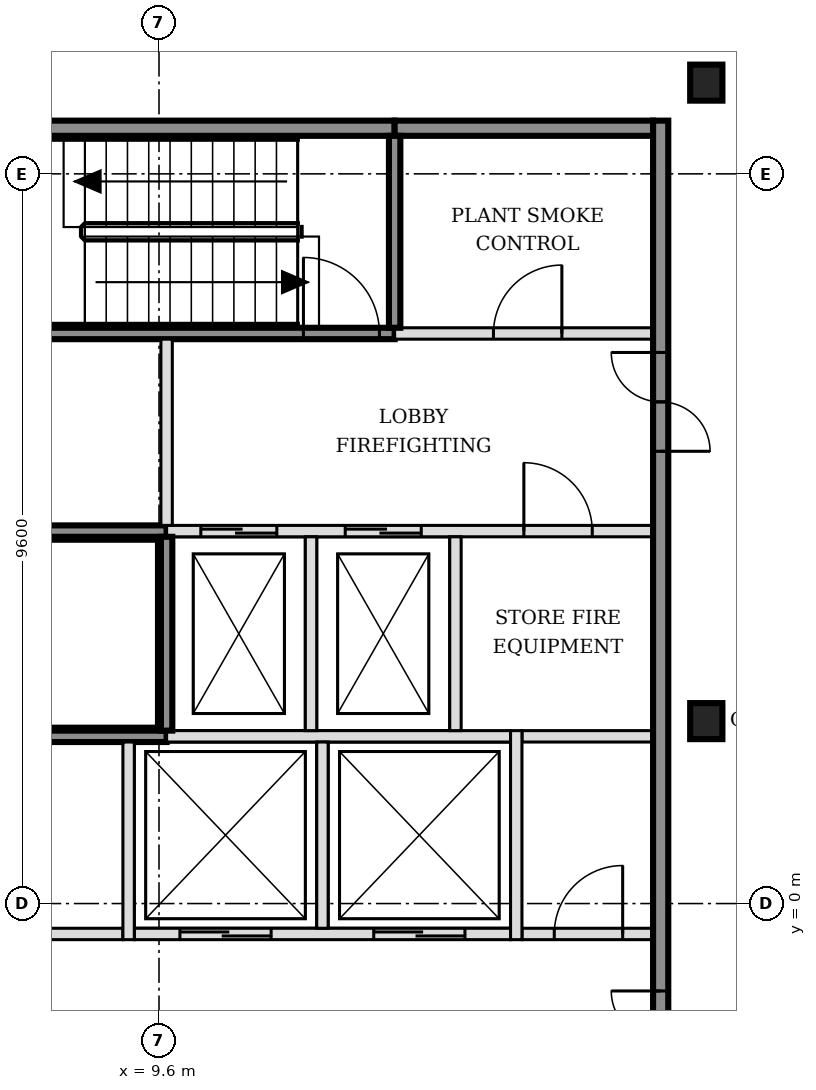
"""IFC4 building model, lengths in metres.
Left out: names, types, materials, properties, quantities, classifications, styles, units other than length and angle.
Written with IfcOpenShell. Run it as: python <this file> out.ifc"""

import sys

from ifc_helpers import new_model, si_unit, direction, frame, frame_2d, origin, origin_2d, place, context, subcontext, project, spatial, rectangle, i_section, extrude, element, fill, save


model = new_model("IFC4")
c1 = context("Model", 3, precision=1e-05, world=origin(), true_north=direction((0.0, 1.0)))
c2 = subcontext(c1, "Body", "Model", "MODEL_VIEW")
j1 = project(units=[si_unit("LENGTHUNIT", "METRE"), si_unit("PLANEANGLEUNIT", "RADIAN")], contexts=[c1])
p1 = place(None, origin())
s1 = spatial("IfcSite", under=j1, at=p1, CompositionType="ELEMENT")
p2 = place(p1, origin())
s2 = spatial("IfcBuilding", under=s1, at=p2, CompositionType="ELEMENT")
p3 = place(p2, frame((0.0, 0.0, 132.6)))
s3 = spatial("IfcBuildingStorey", under=s2, at=p3, CompositionType="ELEMENT", Elevation=132.6)
for number, where, z_axis, x_axis in (
    (1, (16.8, 2.4, -0.15), (0.0, 0.0, 1.0), (1.0, 0.0, 0.0)),
    (2, (16.8, 10.8, -0.15), (0.0, 0.0, 1.0), (1.0, 0.0, 0.0)),
):
    element("IfcColumn", number, at=place(p3, frame(where, z_axis=z_axis, x_axis=x_axis)), inside=s3, PredefinedType="COLUMN", context=c2, shape_type="SweptSolid", body=[
        extrude(i_section(OverallWidth=0.424, OverallDepth=0.474, WebThickness=0.048, FlangeThickness=0.077, FilletRadius=0.015, at=origin_2d()), origin(), (0.0, 0.0, 1.0), 3.6),
    ])
p4 = place(p3, frame((-1.7, -0.4, 0.0), z_axis=(0.0, 0.0, 1.0), x_axis=(1.0, 0.0, 0.0)))
e3 = element("IfcWall", 3, at=p4, inside=s3, PredefinedType="PARTITIONING", context=c2, shape_type="SweptSolid", body=[
    extrude(rectangle(XDim=10.825, YDim=0.15, at=frame_2d((5.413, 0.0))), origin(), (0.0, 0.0, 1.0), 3.45),
])
p5 = place(p4, frame((4.95, 0.0, 0.0)))
e4 = element("IfcOpeningElement", 4, at=p5, cuts=e3, PredefinedType="OPENING", context=c2, shape_type="SweptSolid", body=[
    extrude(rectangle(XDim=0.9, YDim=2.1, at=frame_2d((0.45, 1.05))), frame((0.0, 0.085, 0.0), z_axis=(0.0, -1.0, 0.0), x_axis=(1.0, 0.0, 0.0)), (0.0, 0.0, 1.0), 0.17),
])
p6 = place(p3, frame((9.275, -0.4, 0.0), z_axis=(0.0, 0.0, 1.0), x_axis=(1.0, 0.0, 0.0)))
e5 = element("IfcWall", 5, at=p6, inside=s3, PredefinedType="SOLIDWALL", context=c2, shape_type="SweptSolid", body=[
    extrude(rectangle(XDim=4.95, YDim=0.15, at=frame_2d((2.475, 0.0))), origin(), (0.0, 0.0, 1.0), 3.45),
])
p7 = place(p6, frame((0.6, 0.0, 0.0)))
e6 = element("IfcOpeningElement", 6, at=p7, cuts=e5, PredefinedType="OPENING", context=c2, shape_type="SweptSolid", body=[
    extrude(rectangle(XDim=1.2, YDim=2.1, at=frame_2d((0.6, 1.05))), frame((0.0, 0.085, 0.0), z_axis=(0.0, -1.0, 0.0), x_axis=(1.0, 0.0, 0.0)), (0.0, 0.0, 1.0), 0.17),
])
p8 = place(p6, frame((3.15, 0.0, 0.0)))
e7 = element("IfcOpeningElement", 7, at=p8, cuts=e5, PredefinedType="OPENING", context=c2, shape_type="SweptSolid", body=[
    extrude(rectangle(XDim=1.2, YDim=2.1, at=frame_2d((0.6, 1.05))), frame((0.0, 0.085, 0.0), z_axis=(0.0, -1.0, 0.0), x_axis=(1.0, 0.0, 0.0)), (0.0, 0.0, 1.0), 0.17),
])
p9 = place(p3, frame((14.375, -0.4, 0.0), z_axis=(0.0, 0.0, 1.0), x_axis=(1.0, 0.0, 0.0)))
e8 = element("IfcWall", 8, at=p9, inside=s3, PredefinedType="PARTITIONING", context=c2, shape_type="SweptSolid", body=[
    extrude(rectangle(XDim=1.725, YDim=0.15, at=frame_2d((0.863, 0.0))), origin(), (0.0, 0.0, 1.0), 3.45),
])
p10 = place(p9, frame((0.425, 0.0, 0.0)))
e9 = element("IfcOpeningElement", 9, at=p10, cuts=e8, PredefinedType="OPENING", context=c2, shape_type="SweptSolid", body=[
    extrude(rectangle(XDim=0.9, YDim=2.1, at=frame_2d((0.45, 1.05))), frame((0.0, 0.085, 0.0), z_axis=(0.0, -1.0, 0.0), x_axis=(1.0, 0.0, 0.0)), (0.0, 0.0, 1.0), 0.17),
])
p11 = place(p3, frame((3.2, 2.2, 0.0), z_axis=(0.0, 0.0, 1.0), x_axis=(1.0, 0.0, 0.0)))
e10 = element("IfcWall", 10, at=p11, inside=s3, PredefinedType="SOLIDWALL", context=c2, shape_type="SweptSolid", body=[
    extrude(rectangle(XDim=6.5, YDim=0.15, at=frame_2d((3.25, 0.0))), origin(), (0.0, 0.0, 1.0), 3.45),
])
p12 = place(p3, frame((9.7, 2.2, 0.0), z_axis=(0.0, 0.0, 1.0), x_axis=(1.0, 0.0, 0.0)))
e11 = element("IfcWall", 11, at=p12, inside=s3, PredefinedType="SOLIDWALL", context=c2, shape_type="SweptSolid", body=[
    extrude(rectangle(XDim=4.525, YDim=0.15, at=frame_2d((2.263, 0.0))), origin(), (0.0, 0.0, 1.0), 3.45),
])
p13 = place(p3, frame((14.375, 2.2, 0.0), z_axis=(0.0, 0.0, 1.0), x_axis=(1.0, 0.0, 0.0)))
e12 = element("IfcWall", 12, at=p13, inside=s3, PredefinedType="PARTITIONING", context=c2, shape_type="SweptSolid", body=[
    extrude(rectangle(XDim=1.725, YDim=0.15, at=frame_2d((0.863, 0.0))), origin(), (0.0, 0.0, 1.0), 3.45),
])
p14 = place(p3, frame((3.2, 4.9, 0.0), z_axis=(0.0, 0.0, 1.0), x_axis=(1.0, 0.0, 0.0)))
e13 = element("IfcWall", 13, at=p14, inside=s3, PredefinedType="SOLIDWALL", context=c2, shape_type="SweptSolid", body=[
    extrude(rectangle(XDim=6.5, YDim=0.15, at=frame_2d((3.25, 0.0))), origin(), (0.0, 0.0, 1.0), 3.45),
])
p15 = place(p14, frame((0.175, 0.0, 0.0)))
e14 = element("IfcOpeningElement", 14, at=p15, cuts=e13, PredefinedType="OPENING", context=c2, shape_type="SweptSolid", body=[
    extrude(rectangle(XDim=1.0, YDim=2.1, at=frame_2d((0.5, 1.05))), frame((0.0, 0.085, 0.0), z_axis=(0.0, -1.0, 0.0), x_axis=(1.0, 0.0, 0.0)), (0.0, 0.0, 1.0), 0.17),
])
p16 = place(p3, frame((9.7, 4.9, 0.0), z_axis=(0.0, 0.0, 1.0), x_axis=(1.0, 0.0, 0.0)))
e15 = element("IfcWall", 15, at=p16, inside=s3, PredefinedType="SOLIDWALL", context=c2, shape_type="SweptSolid", body=[
    extrude(rectangle(XDim=6.4, YDim=0.15, at=frame_2d((3.2, 0.0))), origin(), (0.0, 0.0, 1.0), 3.45),
])
p17 = place(p16, frame((0.45, 0.0, 0.0)))
e16 = element("IfcOpeningElement", 16, at=p17, cuts=e15, PredefinedType="OPENING", context=c2, shape_type="SweptSolid", body=[
    extrude(rectangle(XDim=1.0, YDim=2.1, at=frame_2d((0.5, 1.05))), frame((0.0, 0.085, 0.0), z_axis=(0.0, -1.0, 0.0), x_axis=(1.0, 0.0, 0.0)), (0.0, 0.0, 1.0), 0.17),
])
p18 = place(p16, frame((2.35, 0.0, 0.0)))
e17 = element("IfcOpeningElement", 17, at=p18, cuts=e15, PredefinedType="OPENING", context=c2, shape_type="SweptSolid", body=[
    extrude(rectangle(XDim=1.0, YDim=2.1, at=frame_2d((0.5, 1.05))), frame((0.0, 0.085, 0.0), z_axis=(0.0, -1.0, 0.0), x_axis=(1.0, 0.0, 0.0)), (0.0, 0.0, 1.0), 0.17),
])
p19 = place(p16, frame((4.7, 0.0, 0.0)))
e18 = element("IfcOpeningElement", 18, at=p19, cuts=e15, PredefinedType="OPENING", context=c2, shape_type="SweptSolid", body=[
    extrude(rectangle(XDim=0.9, YDim=2.1, at=frame_2d((0.45, 1.05))), frame((0.0, 0.085, 0.0), z_axis=(0.0, -1.0, 0.0), x_axis=(1.0, 0.0, 0.0)), (0.0, 0.0, 1.0), 0.17),
])
p20 = place(p3, frame((6.275, 7.5, 0.0), z_axis=(0.0, 0.0, 1.0), x_axis=(1.0, 0.0, 0.0)))
e19 = element("IfcWall", 19, at=p20, inside=s3, PredefinedType="SOLIDWALL", context=c2, shape_type="SweptSolid", body=[
    extrude(rectangle(XDim=6.425, YDim=0.15, at=frame_2d((3.212, 0.0))), origin(), (0.0, 0.0, 1.0), 3.45),
])
p21 = place(p20, frame((5.225, 0.0, 0.0)))
e20 = element("IfcOpeningElement", 20, at=p21, cuts=e19, PredefinedType="OPENING", context=c2, shape_type="SweptSolid", body=[
    extrude(rectangle(XDim=1.0, YDim=2.1, at=frame_2d((0.5, 1.05))), frame((0.0, 0.085, 0.0), z_axis=(0.0, -1.0, 0.0), x_axis=(1.0, 0.0, 0.0)), (0.0, 0.0, 1.0), 0.17),
])
p22 = place(p3, frame((12.7, 7.5, 0.0), z_axis=(0.0, 0.0, 1.0), x_axis=(1.0, 0.0, 0.0)))
e21 = element("IfcWall", 21, at=p22, inside=s3, PredefinedType="SOLIDWALL", context=c2, shape_type="SweptSolid", body=[
    extrude(rectangle(XDim=3.4, YDim=0.15, at=frame_2d((1.7, 0.0))), origin(), (0.0, 0.0, 1.0), 3.45),
])
p23 = place(p22, frame((1.3, 0.0, 0.0)))
e22 = element("IfcOpeningElement", 22, at=p23, cuts=e21, PredefinedType="OPENING", context=c2, shape_type="SweptSolid", body=[
    extrude(rectangle(XDim=0.9, YDim=2.1, at=frame_2d((0.45, 1.05))), frame((0.0, 0.085, 0.0), z_axis=(0.0, -1.0, 0.0), x_axis=(1.0, 0.0, 0.0)), (0.0, 0.0, 1.0), 0.17),
])
p24 = place(p3, frame((6.2, 10.2, 0.0), z_axis=(0.0, 0.0, 1.0), x_axis=(1.0, 0.0, 0.0)))
e23 = element("IfcWall", 23, at=p24, inside=s3, PredefinedType="SOLIDWALL", context=c2, shape_type="SweptSolid", body=[
    extrude(rectangle(XDim=6.5, YDim=0.2, at=frame_2d((3.25, 0.0))), origin(), (0.0, 0.0, 1.0), 3.45),
])
p25 = place(p3, frame((12.7, 10.2, 0.0), z_axis=(0.0, 0.0, 1.0), x_axis=(1.0, 0.0, 0.0)))
e24 = element("IfcWall", 24, at=p25, inside=s3, PredefinedType="SOLIDWALL", context=c2, shape_type="SweptSolid", body=[
    extrude(rectangle(XDim=3.4, YDim=0.2, at=frame_2d((1.7, 0.0))), origin(), (0.0, 0.0, 1.0), 3.45),
])
p26 = place(p3, frame((9.2, -0.475, 0.0), z_axis=(0.0, 0.0, 1.0), x_axis=(0.0, 1.0, 0.0)))
e25 = element("IfcWall", 25, at=p26, inside=s3, PredefinedType="SOLIDWALL", context=c2, shape_type="SweptSolid", body=[
    extrude(rectangle(XDim=2.6, YDim=0.15, at=frame_2d((1.3, 0.0))), origin(), (0.0, 0.0, 1.0), 3.45),
])
p27 = place(p3, frame((9.7, 2.275, 0.0), z_axis=(0.0, 0.0, 1.0), x_axis=(0.0, 1.0, 0.0)))
e26 = element("IfcWall", 26, at=p27, inside=s3, PredefinedType="SOLIDWALL", context=c2, shape_type="SweptSolid", body=[
    extrude(rectangle(XDim=2.55, YDim=0.15, at=frame_2d((1.275, 0.0))), origin(), (0.0, 0.0, 1.0), 3.45),
])
p28 = place(p3, frame((9.7, 4.975, 0.0), z_axis=(0.0, 0.0, 1.0), x_axis=(0.0, 1.0, 0.0)))
e27 = element("IfcWall", 27, at=p28, inside=s3, PredefinedType="SOLIDWALL", context=c2, shape_type="SweptSolid", body=[
    extrude(rectangle(XDim=2.45, YDim=0.15, at=frame_2d((1.225, 0.0))), origin(), (0.0, 0.0, 1.0), 3.45),
])
p29 = place(p3, frame((11.6, 2.275, 0.0), z_axis=(0.0, 0.0, 1.0), x_axis=(0.0, 1.0, 0.0)))
e28 = element("IfcWall", 28, at=p29, inside=s3, PredefinedType="SOLIDWALL", context=c2, shape_type="SweptSolid", body=[
    extrude(rectangle(XDim=2.55, YDim=0.15, at=frame_2d((1.275, 0.0))), origin(), (0.0, 0.0, 1.0), 3.45),
])
p30 = place(p3, frame((11.75, -0.325, 0.0), z_axis=(0.0, 0.0, 1.0), x_axis=(0.0, 1.0, 0.0)))
e29 = element("IfcWall", 29, at=p30, inside=s3, PredefinedType="SOLIDWALL", context=c2, shape_type="SweptSolid", body=[
    extrude(rectangle(XDim=2.45, YDim=0.15, at=frame_2d((1.225, 0.0))), origin(), (0.0, 0.0, 1.0), 3.45),
])
p31 = place(p3, frame((12.7, 7.575, 0.0), z_axis=(0.0, 0.0, 1.0), x_axis=(0.0, 1.0, 0.0)))
e30 = element("IfcWall", 30, at=p31, inside=s3, PredefinedType="SOLIDWALL", context=c2, shape_type="SweptSolid", body=[
    extrude(rectangle(XDim=2.525, YDim=0.15, at=frame_2d((1.263, 0.0))), origin(), (0.0, 0.0, 1.0), 3.45),
])
p32 = place(p3, frame((13.5, 2.275, 0.0), z_axis=(0.0, 0.0, 1.0), x_axis=(0.0, 1.0, 0.0)))
e31 = element("IfcWall", 31, at=p32, inside=s3, PredefinedType="SOLIDWALL", context=c2, shape_type="SweptSolid", body=[
    extrude(rectangle(XDim=2.55, YDim=0.15, at=frame_2d((1.275, 0.0))), origin(), (0.0, 0.0, 1.0), 3.45),
])
p33 = place(p3, frame((14.3, -0.475, 0.0), z_axis=(0.0, 0.0, 1.0), x_axis=(0.0, 1.0, 0.0)))
e32 = element("IfcWall", 32, at=p33, inside=s3, PredefinedType="SOLIDWALL", context=c2, shape_type="SweptSolid", body=[
    extrude(rectangle(XDim=2.75, YDim=0.15, at=frame_2d((1.375, 0.0))), origin(), (0.0, 0.0, 1.0), 3.45),
])
p34 = place(p3, frame((16.2, -5.5, 0.0), z_axis=(0.0, 0.0, 1.0), x_axis=(0.0, 1.0, 0.0)))
e33 = element("IfcWall", 33, at=p34, inside=s3, PredefinedType="SOLIDWALL", context=c2, shape_type="SweptSolid", body=[
    extrude(rectangle(XDim=15.8, YDim=0.2, at=frame_2d((7.9, 0.0))), origin(), (0.0, 0.0, 1.0), 3.45),
])
p35 = place(p34, frame((3.05, 0.0, 0.0)))
e34 = element("IfcOpeningElement", 34, at=p35, cuts=e33, PredefinedType="OPENING", context=c2, shape_type="SweptSolid", body=[
    extrude(rectangle(XDim=1.3, YDim=2.1, at=frame_2d((0.65, 1.05))), frame((0.0, 0.11, 0.0), z_axis=(0.0, -1.0, 0.0), x_axis=(1.0, 0.0, 0.0)), (0.0, 0.0, 1.0), 0.22),
])
p36 = place(p34, frame((11.45, 0.0, 0.0)))
e35 = element("IfcOpeningElement", 35, at=p36, cuts=e33, PredefinedType="OPENING", context=c2, shape_type="SweptSolid", body=[
    extrude(rectangle(XDim=1.3, YDim=2.1, at=frame_2d((0.65, 1.05))), frame((0.0, 0.11, 0.0), z_axis=(0.0, -1.0, 0.0), x_axis=(1.0, 0.0, 0.0)), (0.0, 0.0, 1.0), 0.22),
])
p37 = place(p3, frame((31.072, 4.722, 0.0), z_axis=(0.0, 0.0, 1.0), x_axis=(-0.707106781187, 0.707106781187, 0.0)))
e36 = element("IfcWall", 36, at=p37, inside=s3, PredefinedType="PARTITIONING", context=c2, shape_type="SweptSolid", body=[
    extrude(rectangle(XDim=23.688, YDim=0.15, at=frame_2d((11.844, 0.0))), origin(), (0.0, 0.0, 1.0), 2.73),
])
p38 = place(p37, frame((8.135, 0.0, 0.0)))
e37 = element("IfcOpeningElement", 37, at=p38, cuts=e36, PredefinedType="OPENING", context=c2, shape_type="SweptSolid", body=[
    extrude(rectangle(XDim=0.9, YDim=2.1, at=frame_2d((0.45, 1.05))), frame((0.0, 0.085, 0.0), z_axis=(0.0, -1.0, 0.0), x_axis=(1.0, 0.0, 0.0)), (0.0, 0.0, 1.0), 0.17),
])
p39 = place(p37, frame((13.091, 0.0, 0.0)))
e38 = element("IfcOpeningElement", 38, at=p39, cuts=e36, PredefinedType="OPENING", context=c2, shape_type="SweptSolid", body=[
    extrude(rectangle(XDim=0.9, YDim=2.1, at=frame_2d((0.45, 1.05))), frame((0.0, 0.085, 0.0), z_axis=(0.0, -1.0, 0.0), x_axis=(1.0, 0.0, 0.0)), (0.0, 0.0, 1.0), 0.17),
])
p40 = place(p37, frame((18.69, 0.0, 0.0)))
e39 = element("IfcOpeningElement", 39, at=p40, cuts=e36, PredefinedType="OPENING", context=c2, shape_type="SweptSolid", body=[
    extrude(rectangle(XDim=0.9, YDim=2.1, at=frame_2d((0.45, 1.05))), frame((0.0, 0.085, 0.0), z_axis=(0.0, -1.0, 0.0), x_axis=(1.0, 0.0, 0.0)), (0.0, 0.0, 1.0), 0.17),
])
p41 = place(p7, origin())
e40 = element("IfcDoor", 40, at=p41, inside=s3, OperationType="DOUBLE_DOOR_SLIDING", PredefinedType="DOOR", context=c2, shape_type="SweptSolid", body=[
    extrude(rectangle(XDim=1.2, YDim=2.1, at=frame_2d((0.6, 1.05))), frame((0.0, 0.025, 0.0), z_axis=(0.0, -1.0, 0.0), x_axis=(1.0, 0.0, 0.0)), (0.0, 0.0, 1.0), 0.05),
])
fill(e6, e40)
p42 = place(p8, origin())
e41 = element("IfcDoor", 41, at=p42, inside=s3, OperationType="DOUBLE_DOOR_SLIDING", PredefinedType="DOOR", context=c2, shape_type="SweptSolid", body=[
    extrude(rectangle(XDim=1.2, YDim=2.1, at=frame_2d((0.6, 1.05))), frame((0.0, 0.025, 0.0), z_axis=(0.0, -1.0, 0.0), x_axis=(1.0, 0.0, 0.0)), (0.0, 0.0, 1.0), 0.05),
])
fill(e7, e41)
p43 = place(p17, origin())
e42 = element("IfcDoor", 42, at=p43, inside=s3, OperationType="DOUBLE_DOOR_SLIDING", PredefinedType="DOOR", context=c2, shape_type="SweptSolid", body=[
    extrude(rectangle(XDim=1.0, YDim=2.1, at=frame_2d((0.5, 1.05))), frame((0.0, 0.025, 0.0), z_axis=(0.0, -1.0, 0.0), x_axis=(1.0, 0.0, 0.0)), (0.0, 0.0, 1.0), 0.05),
])
fill(e16, e42)
p44 = place(p18, origin())
e43 = element("IfcDoor", 43, at=p44, inside=s3, OperationType="DOUBLE_DOOR_SLIDING", PredefinedType="DOOR", context=c2, shape_type="SweptSolid", body=[
    extrude(rectangle(XDim=1.0, YDim=2.1, at=frame_2d((0.5, 1.05))), frame((0.0, 0.025, 0.0), z_axis=(0.0, -1.0, 0.0), x_axis=(1.0, 0.0, 0.0)), (0.0, 0.0, 1.0), 0.05),
])
fill(e17, e43)
p45 = place(p21, origin())
e44 = element("IfcDoor", 44, at=p45, inside=s3, OperationType="SINGLE_SWING_LEFT", PredefinedType="DOOR", context=c2, shape_type="SweptSolid", body=[
    extrude(rectangle(XDim=1.0, YDim=2.1, at=frame_2d((0.5, 1.05))), frame((0.0, 0.025, 0.0), z_axis=(0.0, -1.0, 0.0), x_axis=(1.0, 0.0, 0.0)), (0.0, 0.0, 1.0), 0.05),
])
fill(e20, e44)
p46 = place(p35, origin())
e45 = element("IfcDoor", 45, at=p46, inside=s3, OperationType="DOUBLE_DOOR_SINGLE_SWING", PredefinedType="DOOR", context=c2, shape_type="SweptSolid", body=[
    extrude(rectangle(XDim=1.3, YDim=2.1, at=frame_2d((0.65, 1.05))), frame((0.0, 0.025, 0.0), z_axis=(0.0, -1.0, 0.0), x_axis=(1.0, 0.0, 0.0)), (0.0, 0.0, 1.0), 0.05),
])
fill(e34, e45)
p47 = place(p36, origin())
e46 = element("IfcDoor", 46, at=p47, inside=s3, OperationType="DOUBLE_DOOR_SINGLE_SWING", PredefinedType="DOOR", context=c2, shape_type="SweptSolid", body=[
    extrude(rectangle(XDim=1.3, YDim=2.1, at=frame_2d((0.65, 1.05))), frame((0.0, 0.025, 0.0), z_axis=(0.0, -1.0, 0.0), x_axis=(1.0, 0.0, 0.0)), (0.0, 0.0, 1.0), 0.05),
])
fill(e35, e46)
p48 = place(p10, origin())
e47 = element("IfcDoor", 47, at=p48, inside=s3, OperationType="SINGLE_SWING_RIGHT", PredefinedType="DOOR", context=c2, shape_type="SweptSolid", body=[
    extrude(rectangle(XDim=0.9, YDim=2.1, at=frame_2d((0.45, 1.05))), frame((0.0, 0.025, 0.0), z_axis=(0.0, -1.0, 0.0), x_axis=(1.0, 0.0, 0.0)), (0.0, 0.0, 1.0), 0.05),
])
fill(e9, e47)
p49 = place(p19, origin())
e48 = element("IfcDoor", 48, at=p49, inside=s3, OperationType="SINGLE_SWING_LEFT", PredefinedType="DOOR", context=c2, shape_type="SweptSolid", body=[
    extrude(rectangle(XDim=0.9, YDim=2.1, at=frame_2d((0.45, 1.05))), frame((0.0, 0.025, 0.0), z_axis=(0.0, -1.0, 0.0), x_axis=(1.0, 0.0, 0.0)), (0.0, 0.0, 1.0), 0.05),
])
fill(e18, e48)
p50 = place(p23, origin())
e49 = element("IfcDoor", 49, at=p50, inside=s3, OperationType="SINGLE_SWING_RIGHT", PredefinedType="DOOR", context=c2, shape_type="SweptSolid", body=[
    extrude(rectangle(XDim=0.9, YDim=2.1, at=frame_2d((0.45, 1.05))), frame((0.0, 0.025, 0.0), z_axis=(0.0, -1.0, 0.0), x_axis=(1.0, 0.0, 0.0)), (0.0, 0.0, 1.0), 0.05),
])
fill(e22, e49)
save(model, sys.argv[1])
